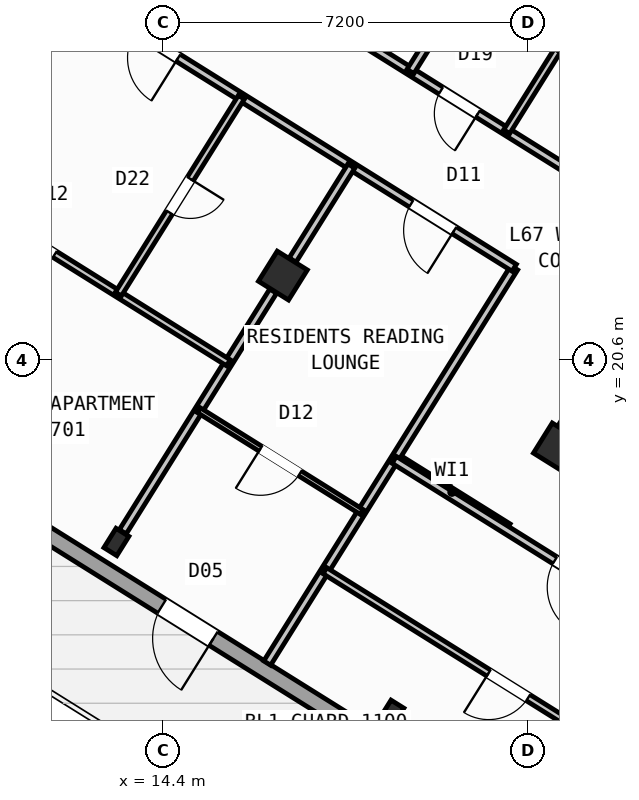
"""IFC4 building model, lengths in metres.
Left out: names, types, materials, properties, quantities, classifications, styles, units other than length and angle.
Written with IfcOpenShell. Run it as: python <this file> out.ifc"""

import sys

from ifc_helpers import new_model, si_unit, direction, frame, frame_2d, origin, origin_2d, place, context, subcontext, project, spatial, rectangle, hollow_rectangle, i_section, extrude, source, transform, mapped, element, fill, save


model = new_model("IFC4")
c1 = context("Model", 3, precision=1e-05, world=origin(), true_north=direction((0.0, 1.0)))
c2 = subcontext(c1, "Body", "Model", "MODEL_VIEW")
j1 = project(units=[si_unit("LENGTHUNIT", "METRE"), si_unit("PLANEANGLEUNIT", "RADIAN")], contexts=[c1])
p1 = place(None, origin())
s1 = spatial("IfcSite", under=j1, at=p1, CompositionType="ELEMENT")
p2 = place(p1, origin())
s2 = spatial("IfcBuilding", under=s1, at=p2, CompositionType="ELEMENT")
p3 = place(p2, frame((0.0, 0.0, 266.4)))
s3 = spatial("IfcBuildingStorey", under=s2, at=p3, CompositionType="ELEMENT", Elevation=266.4)
p4 = place(p3, frame((33.324, 12.503, 0.0), z_axis=(0.0, 0.0, 1.0), x_axis=(-0.848043529849, 0.529926571782, 0.0)))
e1 = element("IfcWall", 1, at=p4, inside=s3, PredefinedType="SHEAR", context=c2, shape_type="SweptSolid", body=[
    extrude(rectangle(XDim=13.04, YDim=0.45, at=frame_2d((6.52, 0.0))), origin(), (0.0, 0.0, 1.0), 3.35),
])
m1 = source(origin(), c2, "Body", "SweptSolid", [
    extrude(hollow_rectangle(XDim=0.7, YDim=0.7, WallThickness=0.028, at=origin_2d()), origin(), (0.0, 0.0, 1.0), 3.6),
])
p5 = place(p3, frame((22.191, 18.87, 0.0), z_axis=(0.0, 0.0, 1.0), x_axis=(-0.848048096156, 0.529919264233, 0.0)))
e2 = element("IfcColumn", 2, at=p5, inside=s3, PredefinedType="COLUMN", context=c2, shape_type="MappedRepresentation", body=[
    mapped(m1, transform((0.0, 0.0, 0.0), scale=1.0)),
])
m2 = source(origin(), c2, "Body", "SweptSolid", [
    extrude(i_section(OverallWidth=0.3, OverallDepth=0.45, WebThickness=0.014, FlangeThickness=0.026, at=origin_2d()), origin(), (0.0, 0.0, 1.0), 3.6),
])
p6 = place(p3, frame((18.906, 13.612, 0.0), z_axis=(0.0, 0.0, 1.0), x_axis=(-0.848048096156, 0.529919264233, 0.0)))
e3 = element("IfcColumn", 3, at=p6, inside=s3, PredefinedType="COLUMN", context=c2, shape_type="MappedRepresentation", body=[
    mapped(m2, transform((0.0, 0.0, 0.0), scale=1.0)),
])
p7 = place(p3, frame((16.764, 22.261, 0.0), z_axis=(0.0, 0.0, 1.0), x_axis=(-0.848048096156, 0.529919264233, 0.0)))
e4 = element("IfcColumn", 4, at=p7, inside=s3, PredefinedType="COLUMN", context=c2, shape_type="MappedRepresentation", body=[
    mapped(m1, transform((0.0, 0.0, 0.0), scale=1.0)),
])
p8 = place(p3, frame((13.478, 17.003, 0.0), z_axis=(0.0, 0.0, 1.0), x_axis=(-0.848048096156, 0.529919264233, 0.0)))
e5 = element("IfcColumn", 5, at=p8, inside=s3, PredefinedType="COLUMN", context=c2, shape_type="MappedRepresentation", body=[
    mapped(m2, transform((0.0, 0.0, 0.0), scale=1.0)),
])
p9 = place(p3, frame((29.268, 6.429, 0.0), z_axis=(0.0, 0.0, 1.0), x_axis=(-0.848049971435, 0.529916263149, 0.0)))
e6 = element("IfcWall", 6, at=p9, inside=s3, PredefinedType="STANDARD", context=c2, shape_type="SweptSolid", body=[
    extrude(rectangle(XDim=31.588, YDim=0.32, at=frame_2d((15.794, 0.0))), origin(), (0.0, 0.0, 1.0), 3.35),
])
p10 = place(p9, frame((16.362, 0.0, 0.0)))
e7 = element("IfcOpeningElement", 7, at=p10, cuts=e6, PredefinedType="OPENING", context=c2, shape_type="SweptSolid", body=[
    extrude(rectangle(XDim=1.2, YDim=2.15, at=frame_2d((0.6, 1.075))), frame((0.0, 0.17, 0.0), z_axis=(0.0, -1.0, 0.0), x_axis=(1.0, 0.0, 0.0)), (0.0, 0.0, 1.0), 0.34),
])
p11 = place(p9, frame((3.859, 0.0, 0.9)))
e8 = element("IfcOpeningElement", 8, at=p11, cuts=e6, PredefinedType="OPENING", context=c2, shape_type="SweptSolid", body=[
    extrude(rectangle(XDim=1.65, YDim=1.45, at=frame_2d((0.825, 0.725))), frame((0.0, 0.17, 0.0), z_axis=(0.0, -1.0, 0.0), x_axis=(1.0, 0.0, 0.0)), (0.0, 0.0, 1.0), 0.34),
])
p12 = place(p9, frame((10.519, 0.0, 0.9)))
e9 = element("IfcOpeningElement", 9, at=p12, cuts=e6, PredefinedType="OPENING", context=c2, shape_type="SweptSolid", body=[
    extrude(rectangle(XDim=1.65, YDim=1.45, at=frame_2d((0.825, 0.725))), frame((0.0, 0.17, 0.0), z_axis=(0.0, -1.0, 0.0), x_axis=(1.0, 0.0, 0.0)), (0.0, 0.0, 1.0), 0.34),
])
p13 = place(p9, frame((21.219, 0.0, 0.95)))
e10 = element("IfcOpeningElement", 10, at=p13, cuts=e6, PredefinedType="OPENING", context=c2, shape_type="SweptSolid", body=[
    extrude(rectangle(XDim=1.95, YDim=1.35, at=frame_2d((0.975, 0.675))), frame((0.0, 0.17, 0.0), z_axis=(0.0, -1.0, 0.0), x_axis=(1.0, 0.0, 0.0)), (0.0, 0.0, 1.0), 0.34),
])
p14 = place(p9, frame((26.406, 0.0, 1.0)))
e11 = element("IfcOpeningElement", 11, at=p14, cuts=e6, PredefinedType="OPENING", context=c2, shape_type="SweptSolid", body=[
    extrude(rectangle(XDim=0.9, YDim=1.25, at=frame_2d((0.45, 0.625))), frame((0.0, 0.17, 0.0), z_axis=(0.0, -1.0, 0.0), x_axis=(1.0, 0.0, 0.0)), (0.0, 0.0, 1.0), 0.34),
])
p15 = place(p9, frame((29.143, 0.0, 0.9)))
e12 = element("IfcOpeningElement", 12, at=p15, cuts=e6, PredefinedType="OPENING", context=c2, shape_type="SweptSolid", body=[
    extrude(rectangle(XDim=1.65, YDim=1.45, at=frame_2d((0.825, 0.725))), frame((0.0, 0.17, 0.0), z_axis=(0.0, -1.0, 0.0), x_axis=(1.0, 0.0, 0.0)), (0.0, 0.0, 1.0), 0.34),
])
p16 = place(p3, frame((2.415, 23.452, 0.0), z_axis=(0.0, 0.0, 1.0), x_axis=(0.52991049553, 0.848053575387, 0.0)))
e13 = element("IfcWall", 13, at=p16, inside=s3, PredefinedType="STANDARD", context=c2, shape_type="SweptSolid", body=[
    extrude(rectangle(XDim=21.587, YDim=0.32, at=frame_2d((10.794, 0.0))), origin(), (0.0, 0.0, 1.0), 2.875),
])
p17 = place(p16, frame((2.606, 0.0, 0.9)))
e14 = element("IfcOpeningElement", 14, at=p17, cuts=e13, PredefinedType="OPENING", context=c2, shape_type="SweptSolid", body=[
    extrude(rectangle(XDim=1.65, YDim=1.45, at=frame_2d((0.825, 0.725))), frame((0.0, 0.17, 0.0), z_axis=(0.0, -1.0, 0.0), x_axis=(1.0, 0.0, 0.0)), (0.0, 0.0, 1.0), 0.34),
])
p18 = place(p16, frame((7.504, 0.0, 1.0)))
e15 = element("IfcOpeningElement", 15, at=p18, cuts=e13, PredefinedType="OPENING", context=c2, shape_type="SweptSolid", body=[
    extrude(rectangle(XDim=0.9, YDim=1.25, at=frame_2d((0.45, 0.625))), frame((0.0, 0.17, 0.0), z_axis=(0.0, -1.0, 0.0), x_axis=(1.0, 0.0, 0.0)), (0.0, 0.0, 1.0), 0.34),
])
p19 = place(p16, frame((12.084, 0.0, 1.0)))
e16 = element("IfcOpeningElement", 16, at=p19, cuts=e13, PredefinedType="OPENING", context=c2, shape_type="SweptSolid", body=[
    extrude(rectangle(XDim=0.9, YDim=1.25, at=frame_2d((0.45, 0.625))), frame((0.0, 0.17, 0.0), z_axis=(0.0, -1.0, 0.0), x_axis=(1.0, 0.0, 0.0)), (0.0, 0.0, 1.0), 0.34),
])
p20 = place(p16, frame((15.619, 0.0, 1.0)))
e17 = element("IfcOpeningElement", 17, at=p20, cuts=e13, PredefinedType="OPENING", context=c2, shape_type="SweptSolid", body=[
    extrude(rectangle(XDim=0.9, YDim=1.25, at=frame_2d((0.45, 0.625))), frame((0.0, 0.17, 0.0), z_axis=(0.0, -1.0, 0.0), x_axis=(1.0, 0.0, 0.0)), (0.0, 0.0, 1.0), 0.34),
])
p21 = place(p16, frame((18.569, 0.0, 1.0)))
e18 = element("IfcOpeningElement", 18, at=p21, cuts=e13, PredefinedType="OPENING", context=c2, shape_type="SweptSolid", body=[
    extrude(rectangle(XDim=0.9, YDim=1.25, at=frame_2d((0.45, 0.625))), frame((0.0, 0.17, 0.0), z_axis=(0.0, -1.0, 0.0), x_axis=(1.0, 0.0, 0.0)), (0.0, 0.0, 1.0), 0.34),
])
p22 = place(p3, frame((14.138, 41.825, 0.0), z_axis=(0.0, 0.0, 1.0), x_axis=(0.848046498049, -0.529921821731, 0.0)))
e19 = element("IfcWall", 19, at=p22, inside=s3, PredefinedType="STANDARD", context=c2, shape_type="SweptSolid", body=[
    extrude(rectangle(XDim=31.588, YDim=0.32, at=frame_2d((15.794, 0.0))), origin(), (0.0, 0.0, 1.0), 3.35),
])
p23 = place(p22, frame((3.46, 0.0, 0.0)))
e20 = element("IfcOpeningElement", 20, at=p23, cuts=e19, PredefinedType="OPENING", context=c2, shape_type="SweptSolid", body=[
    extrude(rectangle(XDim=1.05, YDim=2.15, at=frame_2d((0.525, 1.075))), frame((0.0, 0.17, 0.0), z_axis=(0.0, -1.0, 0.0), x_axis=(1.0, 0.0, 0.0)), (0.0, 0.0, 1.0), 0.34),
])
p24 = place(p22, frame((0.831, 0.0, 1.0)))
e21 = element("IfcOpeningElement", 21, at=p24, cuts=e19, PredefinedType="OPENING", context=c2, shape_type="SweptSolid", body=[
    extrude(rectangle(XDim=0.9, YDim=1.25, at=frame_2d((0.45, 0.625))), frame((0.0, 0.17, 0.0), z_axis=(0.0, -1.0, 0.0), x_axis=(1.0, 0.0, 0.0)), (0.0, 0.0, 1.0), 0.34),
])
p25 = place(p22, frame((8.719, 0.0, 0.9)))
e22 = element("IfcOpeningElement", 22, at=p25, cuts=e19, PredefinedType="OPENING", context=c2, shape_type="SweptSolid", body=[
    extrude(rectangle(XDim=1.35, YDim=1.45, at=frame_2d((0.675, 0.725))), frame((0.0, 0.17, 0.0), z_axis=(0.0, -1.0, 0.0), x_axis=(1.0, 0.0, 0.0)), (0.0, 0.0, 1.0), 0.34),
])
p26 = place(p22, frame((13.599, 0.0, 0.95)))
e23 = element("IfcOpeningElement", 23, at=p26, cuts=e19, PredefinedType="OPENING", context=c2, shape_type="SweptSolid", body=[
    extrude(rectangle(XDim=1.95, YDim=1.35, at=frame_2d((0.975, 0.675))), frame((0.0, 0.17, 0.0), z_axis=(0.0, -1.0, 0.0), x_axis=(1.0, 0.0, 0.0)), (0.0, 0.0, 1.0), 0.34),
])
p27 = place(p22, frame((17.154, 0.0, 1.0)))
e24 = element("IfcOpeningElement", 24, at=p27, cuts=e19, PredefinedType="OPENING", context=c2, shape_type="SweptSolid", body=[
    extrude(rectangle(XDim=0.9, YDim=1.25, at=frame_2d((0.45, 0.625))), frame((0.0, 0.17, 0.0), z_axis=(0.0, -1.0, 0.0), x_axis=(1.0, 0.0, 0.0)), (0.0, 0.0, 1.0), 0.34),
])
p28 = place(p22, frame((21.719, 0.0, 0.9)))
e25 = element("IfcOpeningElement", 25, at=p28, cuts=e19, PredefinedType="OPENING", context=c2, shape_type="SweptSolid", body=[
    extrude(rectangle(XDim=1.65, YDim=1.45, at=frame_2d((0.825, 0.725))), frame((0.0, 0.17, 0.0), z_axis=(0.0, -1.0, 0.0), x_axis=(1.0, 0.0, 0.0)), (0.0, 0.0, 1.0), 0.34),
])
p29 = place(p22, frame((27.419, 0.0, 0.9)))
e26 = element("IfcOpeningElement", 26, at=p29, cuts=e19, PredefinedType="OPENING", context=c2, shape_type="SweptSolid", body=[
    extrude(rectangle(XDim=1.65, YDim=1.45, at=frame_2d((0.825, 0.725))), frame((0.0, 0.17, 0.0), z_axis=(0.0, -1.0, 0.0), x_axis=(1.0, 0.0, 0.0)), (0.0, 0.0, 1.0), 0.34),
])
p30 = place(p3, frame((21.206, 17.292, 0.0), z_axis=(0.0, 0.0, 1.0), x_axis=(-0.848050851465, 0.529914854792, 0.0)))
e27 = element("IfcWall", 27, at=p30, inside=s3, PredefinedType="PARTITIONING", context=c2, shape_type="SweptSolid", body=[
    extrude(rectangle(XDim=2.61, YDim=0.16, at=frame_2d((1.305, 0.0))), origin(), (0.0, 0.0, 1.0), 3.34),
])
p31 = place(p3, frame((21.329, 22.416, 0.0), z_axis=(0.0, 0.0, 1.0), x_axis=(-0.529920220799, -0.848047498427, 0.0)))
e28 = element("IfcWall", 28, at=p31, inside=s3, PredefinedType="PARTITIONING", context=c2, shape_type="SweptSolid", body=[
    extrude(rectangle(XDim=9.2, YDim=0.16, at=frame_2d((4.6, 0.0))), origin(), (0.0, 0.0, 1.0), 3.34),
])
p32 = place(p3, frame((22.495, 24.281, 0.0), z_axis=(0.0, 0.0, 1.0), x_axis=(-0.848052408131, 0.529912363569, 0.0)))
e29 = element("IfcWall", 29, at=p32, inside=s3, PredefinedType="PARTITIONING", context=c2, shape_type="SweptSolid", body=[
    extrude(rectangle(XDim=16.73, YDim=0.16, at=frame_2d((8.365, 0.0))), origin(), (0.0, 0.0, 1.0), 3.34),
])
p33 = place(p32, frame((2.22, 0.0, 0.0)))
e30 = element("IfcOpeningElement", 30, at=p33, cuts=e29, PredefinedType="OPENING", context=c2, shape_type="SweptSolid", body=[
    extrude(rectangle(XDim=0.86, YDim=2.05, at=frame_2d((0.43, 1.025))), frame((0.0, 0.09, 0.0), z_axis=(0.0, -1.0, 0.0), x_axis=(1.0, 0.0, 0.0)), (0.0, 0.0, 1.0), 0.18),
])
p34 = place(p32, frame((6.49, 0.0, 0.0)))
e31 = element("IfcOpeningElement", 31, at=p34, cuts=e29, PredefinedType="OPENING", context=c2, shape_type="SweptSolid", body=[
    extrude(rectangle(XDim=1.0, YDim=2.1, at=frame_2d((0.5, 1.05))), frame((0.0, 0.09, 0.0), z_axis=(0.0, -1.0, 0.0), x_axis=(1.0, 0.0, 0.0)), (0.0, 0.0, 1.0), 0.18),
])
p35 = place(p32, frame((14.76, 0.0, 0.0)))
e32 = element("IfcOpeningElement", 32, at=p35, cuts=e29, PredefinedType="OPENING", context=c2, shape_type="SweptSolid", body=[
    extrude(rectangle(XDim=1.0, YDim=2.1, at=frame_2d((0.5, 1.05))), frame((0.0, 0.09, 0.0), z_axis=(0.0, -1.0, 0.0), x_axis=(1.0, 0.0, 0.0)), (0.0, 0.0, 1.0), 0.18),
])
p36 = place(p3, frame((21.329, 22.416, 0.0), z_axis=(0.0, 0.0, 1.0), x_axis=(-0.848052408131, 0.529912363569, 0.0)))
e33 = element("IfcWall", 33, at=p36, inside=s3, PredefinedType="PARTITIONING", context=c2, shape_type="SweptSolid", body=[
    extrude(rectangle(XDim=16.73, YDim=0.16, at=frame_2d((8.365, 0.0))), origin(), (0.0, 0.0, 1.0), 3.34),
])
p37 = place(p36, frame((1.395, 0.0, 0.0)))
e34 = element("IfcOpeningElement", 34, at=p37, cuts=e33, PredefinedType="OPENING", context=c2, shape_type="SweptSolid", body=[
    extrude(rectangle(XDim=1.0, YDim=2.1, at=frame_2d((0.5, 1.05))), frame((0.0, 0.09, 0.0), z_axis=(0.0, -1.0, 0.0), x_axis=(1.0, 0.0, 0.0)), (0.0, 0.0, 1.0), 0.18),
])
p38 = place(p36, frame((7.82, 0.0, 0.0)))
e35 = element("IfcOpeningElement", 35, at=p38, cuts=e33, PredefinedType="OPENING", context=c2, shape_type="SweptSolid", body=[
    extrude(rectangle(XDim=1.0, YDim=2.1, at=frame_2d((0.5, 1.05))), frame((0.0, 0.09, 0.0), z_axis=(0.0, -1.0, 0.0), x_axis=(1.0, 0.0, 0.0)), (0.0, 0.0, 1.0), 0.18),
])
p39 = place(p36, frame((11.14, 0.0, 0.0)))
e36 = element("IfcOpeningElement", 36, at=p39, cuts=e33, PredefinedType="OPENING", context=c2, shape_type="SweptSolid", body=[
    extrude(rectangle(XDim=1.0, YDim=2.1, at=frame_2d((0.5, 1.05))), frame((0.0, 0.09, 0.0), z_axis=(0.0, -1.0, 0.0), x_axis=(1.0, 0.0, 0.0)), (0.0, 0.0, 1.0), 0.18),
])
p40 = place(p3, frame((18.115, 24.424, 0.0), z_axis=(0.0, 0.0, 1.0), x_axis=(-0.529998940003, -0.847998304005, 0.0)))
e37 = element("IfcWall", 37, at=p40, inside=s3, PredefinedType="PARTITIONING", context=c2, shape_type="SweptSolid", body=[
    extrude(rectangle(XDim=2.188, YDim=0.16, at=frame_2d((1.094, 0.0))), origin(), (0.0, 0.0, 1.0), 2.875),
])
p41 = place(p3, frame((16.572, 21.954, 0.0), z_axis=(0.0, 0.0, 1.0), x_axis=(-0.529904903214, -0.848057069748, 0.0)))
e38 = element("IfcWall", 38, at=p41, inside=s3, PredefinedType="PARTITIONING", context=c2, shape_type="SweptSolid", body=[
    extrude(rectangle(XDim=5.601, YDim=0.16, at=frame_2d((2.801, 0.0))), origin(), (0.0, 0.0, 1.0), 2.875),
])
p42 = place(p3, frame((18.318, 17.597, 0.0), z_axis=(0.0, 0.0, 1.0), x_axis=(-0.848059820872, 0.529900500304, 0.0)))
e39 = element("IfcWall", 39, at=p42, inside=s3, PredefinedType="PARTITIONING", context=c2, shape_type="SweptSolid", body=[
    extrude(rectangle(XDim=3.79, YDim=0.11, at=frame_2d((1.895, 0.0))), origin(), (0.0, 0.0, 1.0), 3.34),
])
p43 = place(p42, frame((1.435, 0.0, 0.0)))
e40 = element("IfcOpeningElement", 40, at=p43, cuts=e39, PredefinedType="OPENING", context=c2, shape_type="SweptSolid", body=[
    extrude(rectangle(XDim=0.92, YDim=2.08, at=frame_2d((0.46, 1.04))), frame((0.0, 0.065, 0.0), z_axis=(0.0, -1.0, 0.0), x_axis=(1.0, 0.0, 0.0)), (0.0, 0.0, 1.0), 0.13),
])
p44 = place(p3, frame((12.688, 27.815, 0.0), z_axis=(0.0, 0.0, 1.0), x_axis=(-0.52994879608, -0.848029641896, 0.0)))
e41 = element("IfcWall", 41, at=p44, inside=s3, PredefinedType="PARTITIONING", context=c2, shape_type="SweptSolid", body=[
    extrude(rectangle(XDim=2.188, YDim=0.16, at=frame_2d((1.094, 0.0))), origin(), (0.0, 0.0, 1.0), 2.875),
])
p45 = place(p3, frame((15.688, 20.54, 0.0), z_axis=(0.0, 0.0, 1.0), x_axis=(-0.848049732085, 0.529916646191, 0.0)))
e42 = element("IfcWall", 42, at=p45, inside=s3, PredefinedType="PLUMBINGWALL", context=c2, shape_type="SweptSolid", body=[
    extrude(rectangle(XDim=6.4, YDim=0.14, at=frame_2d((3.2, 0.0))), origin(), (0.0, 0.0, 1.0), 3.34),
])
p46 = place(p45, frame((4.04, 0.0, 0.0)))
e43 = element("IfcOpeningElement", 43, at=p46, cuts=e42, PredefinedType="OPENING", context=c2, shape_type="SweptSolid", body=[
    extrude(rectangle(XDim=0.92, YDim=2.08, at=frame_2d((0.46, 1.04))), frame((0.0, 0.08, 0.0), z_axis=(0.0, -1.0, 0.0), x_axis=(1.0, 0.0, 0.0)), (0.0, 0.0, 1.0), 0.16),
])
p47 = place(p3, frame((15.944, 25.781, 0.0), z_axis=(0.0, 0.0, 1.0), x_axis=(-0.529917480809, -0.848049210561, 0.0)))
e44 = element("IfcWall", 44, at=p47, inside=s3, PredefinedType="PLUMBINGWALL", context=c2, shape_type="SweptSolid", body=[
    extrude(rectangle(XDim=4.58, YDim=0.14, at=frame_2d((2.29, 0.0))), origin(), (0.0, 0.0, 1.0), 3.34),
])
p48 = place(p47, frame((1.9, 0.0, 0.0)))
e45 = element("IfcOpeningElement", 45, at=p48, cuts=e44, PredefinedType="OPENING", context=c2, shape_type="SweptSolid", body=[
    extrude(rectangle(XDim=0.78, YDim=2.05, at=frame_2d((0.39, 1.025))), frame((0.0, 0.08, 0.0), z_axis=(0.0, -1.0, 0.0), x_axis=(1.0, 0.0, 0.0)), (0.0, 0.0, 1.0), 0.16),
])
p49 = place(p3, frame((20.44, 28.145, 0.0), z_axis=(0.0, 0.0, 1.0), x_axis=(-0.5299186965, -0.848048450915, 0.0)))
e46 = element("IfcWall", 46, at=p49, inside=s3, PredefinedType="PARTITIONING", context=c2, shape_type="SweptSolid", body=[
    extrude(rectangle(XDim=2.188, YDim=0.16, at=frame_2d((1.094, 0.0))), origin(), (0.0, 0.0, 1.0), 2.875),
])
p50 = place(p3, frame((23.57, 28.927, 0.0), z_axis=(0.0, 0.0, 1.0), x_axis=(-0.529911350634, -0.84805304107, 0.0)))
e47 = element("IfcWall", 47, at=p50, inside=s3, PredefinedType="PLUMBINGWALL", context=c2, shape_type="SweptSolid", body=[
    extrude(rectangle(XDim=4.51, YDim=0.14, at=frame_2d((2.255, 0.0))), origin(), (0.0, 0.0, 1.0), 3.025),
])
p51 = place(p50, frame((1.865, 0.0, 0.0)))
e48 = element("IfcOpeningElement", 48, at=p51, cuts=e47, PredefinedType="OPENING", context=c2, shape_type="SweptSolid", body=[
    extrude(rectangle(XDim=0.78, YDim=2.05, at=frame_2d((0.39, 1.025))), frame((0.0, 0.08, 0.0), z_axis=(0.0, -1.0, 0.0), x_axis=(1.0, 0.0, 0.0)), (0.0, 0.0, 1.0), 0.16),
])
p52 = place(p3, frame((32.164, 10.374, 0.0), z_axis=(0.0, 0.0, 1.0), x_axis=(-0.848044107957, 0.529925646633, 0.0)))
e49 = element("IfcWall", 49, at=p52, inside=s3, PredefinedType="PARTITIONING", context=c2, shape_type="SweptSolid", body=[
    extrude(rectangle(XDim=15.57, YDim=0.16, at=frame_2d((7.785, 0.0))), origin(), (0.0, 0.0, 1.0), 3.34),
])
p53 = place(p52, frame((10.83, 0.0, 0.0)))
e50 = element("IfcOpeningElement", 50, at=p53, cuts=e49, PredefinedType="OPENING", context=c2, shape_type="SweptSolid", body=[
    extrude(rectangle(XDim=1.0, YDim=2.1, at=frame_2d((0.5, 1.05))), frame((0.0, 0.09, 0.0), z_axis=(0.0, -1.0, 0.0), x_axis=(1.0, 0.0, 0.0)), (0.0, 0.0, 1.0), 0.18),
])
p54 = place(p3, frame((29.72, 8.859, 0.0), z_axis=(0.0, 0.0, 1.0), x_axis=(-0.848049134363, 0.529917602752, 0.0)))
e51 = element("IfcWall", 51, at=p54, inside=s3, PredefinedType="PLUMBINGWALL", context=c2, shape_type="SweptSolid", body=[
    extrude(rectangle(XDim=14.3, YDim=0.14, at=frame_2d((7.15, 0.0))), origin(), (0.0, 0.0, 1.0), 3.34),
])
p55 = place(p54, frame((9.57, 0.0, 0.0)))
e52 = element("IfcOpeningElement", 52, at=p55, cuts=e51, PredefinedType="OPENING", context=c2, shape_type="SweptSolid", body=[
    extrude(rectangle(XDim=0.92, YDim=2.08, at=frame_2d((0.46, 1.04))), frame((0.0, 0.08, 0.0), z_axis=(0.0, -1.0, 0.0), x_axis=(1.0, 0.0, 0.0)), (0.0, 0.0, 1.0), 0.16),
])
m3 = source(origin(), c2, "Body", "SweptSolid", [
    extrude(rectangle(XDim=1.2, YDim=2.15, at=frame_2d((0.6, 1.075))), frame((0.0, 0.025, 0.0), z_axis=(0.0, -1.0, 0.0), x_axis=(1.0, 0.0, 0.0)), (0.0, 0.0, 1.0), 0.05),
])
p56 = place(p10, origin())
e53 = element("IfcDoor", 53, at=p56, inside=s3, OperationType="SINGLE_SWING_LEFT", PredefinedType="DOOR", context=c2, shape_type="MappedRepresentation", body=[
    mapped(m3, transform((0.0, 0.0, 0.0), scale=1.0)),
])
fill(e7, e53)
m4 = source(origin(), c2, "Body", "SweptSolid", [
    extrude(rectangle(XDim=1.0, YDim=2.1, at=frame_2d((0.5, 1.05))), frame((0.0, 0.025, 0.0), z_axis=(0.0, -1.0, 0.0), x_axis=(1.0, 0.0, 0.0)), (0.0, 0.0, 1.0), 0.05),
])
p57 = place(p37, origin())
e54 = element("IfcDoor", 54, at=p57, inside=s3, OperationType="SINGLE_SWING_LEFT", PredefinedType="DOOR", context=c2, shape_type="MappedRepresentation", body=[
    mapped(m4, transform((0.0, 0.0, 0.0), scale=1.0)),
])
fill(e34, e54)
m5 = source(origin(), c2, "Body", "SweptSolid", [
    extrude(rectangle(XDim=0.92, YDim=2.08, at=frame_2d((0.46, 1.04))), frame((0.0, 0.025, 0.0), z_axis=(0.0, -1.0, 0.0), x_axis=(1.0, 0.0, 0.0)), (0.0, 0.0, 1.0), 0.05),
])
p58 = place(p43, origin())
e55 = element("IfcDoor", 55, at=p58, inside=s3, OperationType="SINGLE_SWING_RIGHT", PredefinedType="DOOR", context=c2, shape_type="MappedRepresentation", body=[
    mapped(m5, transform((0.0, 0.0, 0.0), scale=1.0)),
])
fill(e40, e55)
p59 = place(p38, origin())
e56 = element("IfcDoor", 56, at=p59, inside=s3, OperationType="SINGLE_SWING_LEFT", PredefinedType="DOOR", context=c2, shape_type="MappedRepresentation", body=[
    mapped(m4, transform((0.0, 0.0, 0.0), scale=1.0)),
])
fill(e35, e56)
p60 = place(p46, origin())
e57 = element("IfcDoor", 57, at=p60, inside=s3, OperationType="SINGLE_SWING_RIGHT", PredefinedType="DOOR", context=c2, shape_type="MappedRepresentation", body=[
    mapped(m5, transform((0.0, 0.0, 0.0), scale=1.0)),
])
fill(e43, e57)
m6 = source(origin(), c2, "Body", "SweptSolid", [
    extrude(rectangle(XDim=0.78, YDim=2.05, at=frame_2d((0.39, 1.025))), frame((0.0, 0.025, 0.0), z_axis=(0.0, -1.0, 0.0), x_axis=(1.0, 0.0, 0.0)), (0.0, 0.0, 1.0), 0.05),
])
p61 = place(p48, origin())
e58 = element("IfcDoor", 58, at=p61, inside=s3, OperationType="SINGLE_SWING_LEFT", PredefinedType="DOOR", context=c2, shape_type="MappedRepresentation", body=[
    mapped(m6, transform((0.0, 0.0, 0.0), scale=1.0)),
])
fill(e45, e58)
m7 = source(origin(), c2, "Body", "SweptSolid", [
    extrude(rectangle(XDim=0.86, YDim=2.05, at=frame_2d((0.43, 1.025))), frame((0.0, 0.025, 0.0), z_axis=(0.0, -1.0, 0.0), x_axis=(1.0, 0.0, 0.0)), (0.0, 0.0, 1.0), 0.05),
])
p62 = place(p33, origin())
e59 = element("IfcDoor", 59, at=p62, inside=s3, OperationType="SINGLE_SWING_LEFT", PredefinedType="DOOR", context=c2, shape_type="MappedRepresentation", body=[
    mapped(m7, transform((0.0, 0.0, 0.0), scale=1.0)),
])
fill(e30, e59)
p63 = place(p51, origin())
e60 = element("IfcDoor", 60, at=p63, inside=s3, OperationType="SINGLE_SWING_LEFT", PredefinedType="DOOR", context=c2, shape_type="MappedRepresentation", body=[
    mapped(m6, transform((0.0, 0.0, 0.0), scale=1.0)),
])
fill(e48, e60)
p64 = place(p53, origin())
e61 = element("IfcDoor", 61, at=p64, inside=s3, OperationType="SINGLE_SWING_LEFT", PredefinedType="DOOR", context=c2, shape_type="MappedRepresentation", body=[
    mapped(m4, transform((0.0, 0.0, 0.0), scale=1.0)),
])
fill(e50, e61)
p65 = place(p55, origin())
e62 = element("IfcDoor", 62, at=p65, inside=s3, OperationType="SINGLE_SWING_RIGHT", PredefinedType="DOOR", context=c2, shape_type="MappedRepresentation", body=[
    mapped(m5, transform((0.0, 0.0, 0.0), scale=1.0)),
])
fill(e52, e62)
save(model, sys.argv[1])
